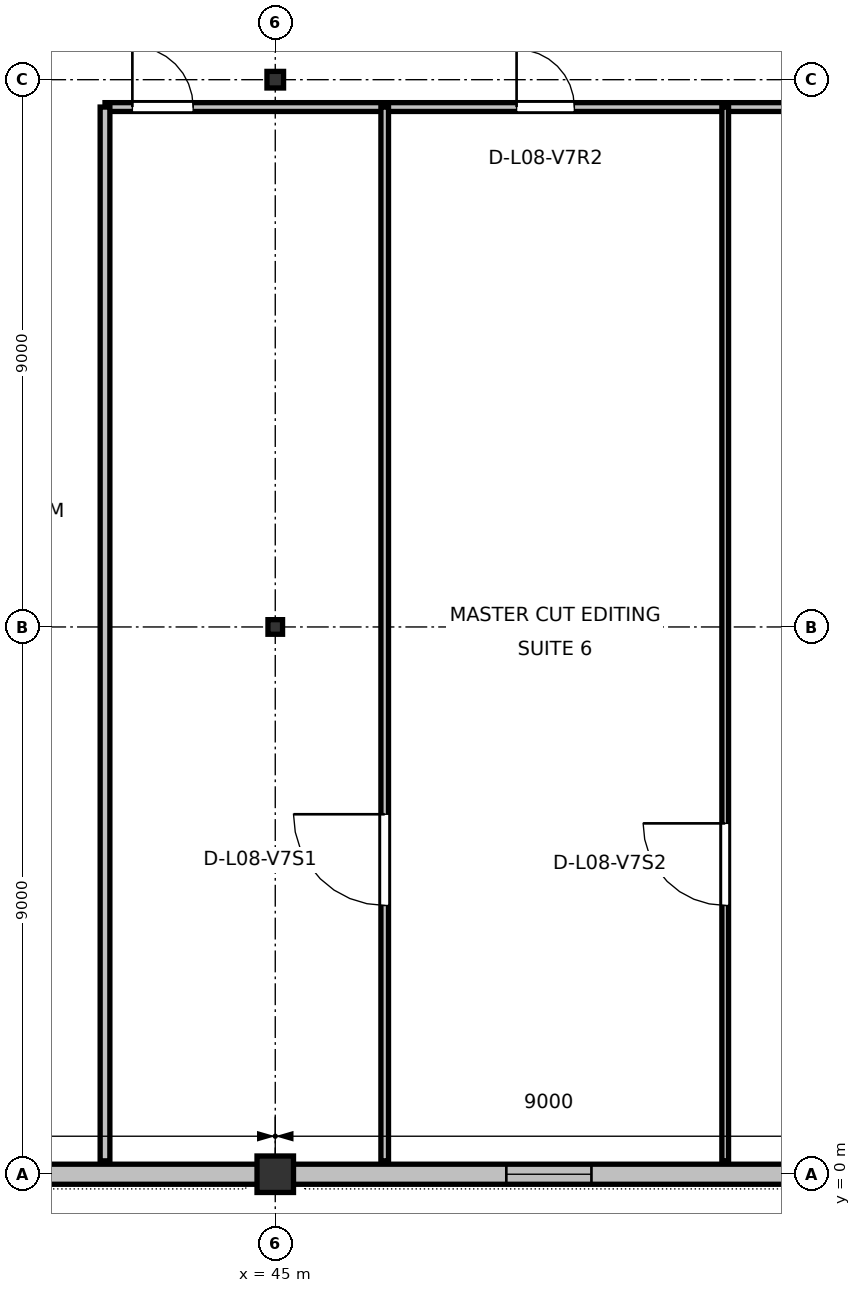
"""IFC4 building model, lengths in metres.
Left out: names, types, materials, properties, quantities, classifications, styles, units other than length and angle.
Written with IfcOpenShell. Run it as: python <this file> out.ifc"""

import sys

from ifc_helpers import new_model, si_unit, direction, frame, frame_2d, origin, origin_2d, place, context, subcontext, project, spatial, rectangle, hollow_circle, i_section, extrude, element, fill, save


model = new_model("IFC4")
c1 = context("Model", 3, precision=1e-05, world=origin(), true_north=direction((0.0, 1.0)))
c2 = subcontext(c1, "Body", "Model", "MODEL_VIEW")
j1 = project(units=[si_unit("LENGTHUNIT", "METRE"), si_unit("PLANEANGLEUNIT", "RADIAN")], contexts=[c1])
p1 = place(None, origin())
s1 = spatial("IfcSite", under=j1, at=p1, CompositionType="ELEMENT")
p2 = place(p1, origin())
s2 = spatial("IfcBuilding", under=s1, at=p2, CompositionType="ELEMENT")
p3 = place(p2, frame((0.0, 0.0, 36.0)))
s3 = spatial("IfcBuildingStorey", under=s2, at=p3, CompositionType="ELEMENT", Elevation=36.0)
p4 = place(p3, frame((45.0, 0.0, 0.0), z_axis=(0.0, 0.0, 1.0), x_axis=(1.0, 0.0, 0.0)))
e1 = element("IfcColumn", 1, at=p4, inside=s3, PredefinedType="COLUMN", context=c2, shape_type="SweptSolid", body=[
    extrude(rectangle(XDim=0.6, YDim=0.6, at=origin_2d()), origin(), (0.0, 0.0, 1.0), 4.2),
])
p5 = place(p3, frame((45.0, 9.0, 0.0), z_axis=(0.0, 0.0, 1.0), x_axis=(1.0, 0.0, 0.0)))
e2 = element("IfcColumn", 2, at=p5, inside=s3, PredefinedType="COLUMN", context=c2, shape_type="SweptSolid", body=[
    extrude(i_section(OverallWidth=0.24, OverallDepth=0.24, WebThickness=0.01, FlangeThickness=0.017, at=origin_2d()), origin(), (0.0, 0.0, 1.0), 4.2),
])
p6 = place(p3, frame((45.0, 18.0, 0.0), z_axis=(0.0, 0.0, 1.0), x_axis=(1.0, 0.0, 0.0)))
e3 = element("IfcColumn", 3, at=p6, inside=s3, PredefinedType="COLUMN", context=c2, shape_type="SweptSolid", body=[
    extrude(hollow_circle(Radius=0.136, WallThickness=0.012, at=origin_2d()), origin(), (0.0, 0.0, 1.0), 4.2),
])
p7 = place(p3, frame((36.285, 0.0, 0.0), z_axis=(0.0, 0.0, 1.0), x_axis=(1.0, 0.0, 0.0)))
e4 = element("IfcWall", 4, at=p7, inside=s3, PredefinedType="STANDARD", context=c2, shape_type="SweptSolid", body=[
    extrude(rectangle(XDim=8.43, YDim=0.33, at=frame_2d((4.215, 0.0))), origin(), (0.0, 0.0, 1.0), 3.755),
])
p8 = place(p7, frame((0.75, 0.0, 0.9)))
e5 = element("IfcOpeningElement", 5, at=p8, cuts=e4, PredefinedType="OPENING", context=c2, shape_type="SweptSolid", body=[
    extrude(rectangle(XDim=1.6, YDim=1.5, at=frame_2d((0.8, 0.75))), frame((0.0, 0.175, 0.0), z_axis=(0.0, -1.0, 0.0), x_axis=(1.0, 0.0, 0.0)), (0.0, 0.0, 1.0), 0.35),
])
p9 = place(p3, frame((45.285, 0.0, 0.0), z_axis=(0.0, 0.0, 1.0), x_axis=(1.0, 0.0, 0.0)))
e6 = element("IfcWall", 6, at=p9, inside=s3, PredefinedType="STANDARD", context=c2, shape_type="SweptSolid", body=[
    extrude(rectangle(XDim=8.43, YDim=0.33, at=frame_2d((4.215, 0.0))), origin(), (0.0, 0.0, 1.0), 3.755),
])
p10 = place(p9, frame((3.515, 0.0, 0.9)))
e7 = element("IfcOpeningElement", 7, at=p10, cuts=e6, PredefinedType="OPENING", context=c2, shape_type="SweptSolid", body=[
    extrude(rectangle(XDim=1.4, YDim=1.45, at=frame_2d((0.7, 0.725))), frame((0.0, 0.175, 0.0), z_axis=(0.0, -1.0, 0.0), x_axis=(1.0, 0.0, 0.0)), (0.0, 0.0, 1.0), 0.35),
])
p11 = place(p3, frame((42.2, 17.55, 0.0), z_axis=(0.0, 0.0, 1.0), x_axis=(1.0, 0.0, 0.0)))
e8 = element("IfcWall", 8, at=p11, inside=s3, PredefinedType="PARTITIONING", context=c2, shape_type="SweptSolid", body=[
    extrude(rectangle(XDim=23.6, YDim=0.145, at=frame_2d((11.8, 0.0))), origin(), (0.0, 0.0, 1.0), 3.96),
])
p12 = place(p11, frame((0.45, 0.0, 0.0)))
e9 = element("IfcOpeningElement", 9, at=p12, cuts=e8, PredefinedType="OPENING", context=c2, shape_type="SweptSolid", body=[
    extrude(rectangle(XDim=1.0, YDim=2.14, at=frame_2d((0.5, 1.07))), frame((0.0, 0.083, 0.0), z_axis=(0.0, -1.0, 0.0), x_axis=(1.0, 0.0, 0.0)), (0.0, 0.0, 1.0), 0.165),
])
p13 = place(p11, frame((6.769, 0.0, 0.0)))
e10 = element("IfcOpeningElement", 10, at=p13, cuts=e8, PredefinedType="OPENING", context=c2, shape_type="SweptSolid", body=[
    extrude(rectangle(XDim=0.95, YDim=2.12, at=frame_2d((0.475, 1.06))), frame((0.0, 0.083, 0.0), z_axis=(0.0, -1.0, 0.0), x_axis=(1.0, 0.0, 0.0)), (0.0, 0.0, 1.0), 0.165),
])
p14 = place(p11, frame((15.717, 0.0, 0.0)))
e11 = element("IfcOpeningElement", 11, at=p14, cuts=e8, PredefinedType="OPENING", context=c2, shape_type="SweptSolid", body=[
    extrude(rectangle(XDim=0.9, YDim=2.1, at=frame_2d((0.45, 1.05))), frame((0.0, 0.083, 0.0), z_axis=(0.0, -1.0, 0.0), x_axis=(1.0, 0.0, 0.0)), (0.0, 0.0, 1.0), 0.165),
])
p15 = place(p11, frame((21.95, 0.0, 0.0)))
e12 = element("IfcOpeningElement", 12, at=p15, cuts=e8, PredefinedType="OPENING", context=c2, shape_type="SweptSolid", body=[
    extrude(rectangle(XDim=1.2, YDim=2.18, at=frame_2d((0.6, 1.09))), frame((0.0, 0.083, 0.0), z_axis=(0.0, -1.0, 0.0), x_axis=(1.0, 0.0, 0.0)), (0.0, 0.0, 1.0), 0.165),
])
p16 = place(p3, frame((42.2, 0.22, 0.0), z_axis=(0.0, 0.0, 1.0), x_axis=(0.0, 1.0, 0.0)))
e13 = element("IfcWall", 13, at=p16, inside=s3, PredefinedType="PARTITIONING", context=c2, shape_type="SweptSolid", body=[
    extrude(rectangle(XDim=17.33, YDim=0.16, at=frame_2d((8.665, 0.0))), origin(), (0.0, 0.0, 1.0), 3.96),
])
p17 = place(p3, frame((46.8, 0.22, 0.0), z_axis=(0.0, 0.0, 1.0), x_axis=(0.0, 1.0, 0.0)))
e14 = element("IfcWall", 14, at=p17, inside=s3, PredefinedType="PARTITIONING", context=c2, shape_type="SweptSolid", body=[
    extrude(rectangle(XDim=17.33, YDim=0.125, at=frame_2d((8.665, 0.0))), origin(), (0.0, 0.0, 1.0), 3.96),
])
p18 = place(p17, frame((4.2, 0.0, 0.0)))
e15 = element("IfcOpeningElement", 15, at=p18, cuts=e14, PredefinedType="OPENING", context=c2, shape_type="SweptSolid", body=[
    extrude(rectangle(XDim=1.5, YDim=2.2, at=frame_2d((0.75, 1.1))), frame((0.0, 0.073, 0.0), z_axis=(0.0, -1.0, 0.0), x_axis=(1.0, 0.0, 0.0)), (0.0, 0.0, 1.0), 0.145),
])
p19 = place(p3, frame((52.4, 0.22, 0.0), z_axis=(0.0, 0.0, 1.0), x_axis=(0.0, 1.0, 0.0)))
e16 = element("IfcWall", 16, at=p19, inside=s3, PredefinedType="PARTITIONING", context=c2, shape_type="SweptSolid", body=[
    extrude(rectangle(XDim=17.33, YDim=0.11, at=frame_2d((8.665, 0.0))), origin(), (0.0, 0.0, 1.0), 3.96),
])
p20 = place(p19, frame((4.2, 0.0, 0.0)))
e17 = element("IfcOpeningElement", 17, at=p20, cuts=e16, PredefinedType="OPENING", context=c2, shape_type="SweptSolid", body=[
    extrude(rectangle(XDim=1.35, YDim=2.18, at=frame_2d((0.675, 1.09))), frame((0.0, 0.065, 0.0), z_axis=(0.0, -1.0, 0.0), x_axis=(1.0, 0.0, 0.0)), (0.0, 0.0, 1.0), 0.13),
])
p21 = place(p10, origin())
e18 = element("IfcWindow", 18, at=p21, inside=s3, PartitioningType="SINGLE_PANEL", PredefinedType="WINDOW", context=c2, shape_type="SweptSolid", body=[
    extrude(rectangle(XDim=1.4, YDim=1.45, at=frame_2d((0.7, 0.725))), frame((0.0, 0.03, 0.0), z_axis=(0.0, -1.0, 0.0), x_axis=(1.0, 0.0, 0.0)), (0.0, 0.0, 1.0), 0.06),
])
fill(e7, e18)
p22 = place(p12, origin())
e19 = element("IfcDoor", 19, at=p22, inside=s3, OperationType="SINGLE_SWING_LEFT", PredefinedType="DOOR", context=c2, shape_type="SweptSolid", body=[
    extrude(rectangle(XDim=1.0, YDim=2.14, at=frame_2d((0.5, 1.07))), frame((0.0, 0.025, 0.0), z_axis=(0.0, -1.0, 0.0), x_axis=(1.0, 0.0, 0.0)), (0.0, 0.0, 1.0), 0.05),
])
fill(e9, e19)
p23 = place(p18, origin())
e20 = element("IfcDoor", 20, at=p23, inside=s3, OperationType="SINGLE_SWING_RIGHT", PredefinedType="DOOR", context=c2, shape_type="SweptSolid", body=[
    extrude(rectangle(XDim=1.5, YDim=2.2, at=frame_2d((0.75, 1.1))), frame((0.0, 0.025, 0.0), z_axis=(0.0, -1.0, 0.0), x_axis=(1.0, 0.0, 0.0)), (0.0, 0.0, 1.0), 0.05),
])
fill(e15, e20)
p24 = place(p13, origin())
e21 = element("IfcDoor", 21, at=p24, inside=s3, OperationType="SINGLE_SWING_LEFT", PredefinedType="DOOR", context=c2, shape_type="SweptSolid", body=[
    extrude(rectangle(XDim=0.95, YDim=2.12, at=frame_2d((0.475, 1.06))), frame((0.0, 0.025, 0.0), z_axis=(0.0, -1.0, 0.0), x_axis=(1.0, 0.0, 0.0)), (0.0, 0.0, 1.0), 0.05),
])
fill(e10, e21)
p25 = place(p20, origin())
e22 = element("IfcDoor", 22, at=p25, inside=s3, OperationType="SINGLE_SWING_RIGHT", PredefinedType="DOOR", context=c2, shape_type="SweptSolid", body=[
    extrude(rectangle(XDim=1.35, YDim=2.18, at=frame_2d((0.675, 1.09))), frame((0.0, 0.025, 0.0), z_axis=(0.0, -1.0, 0.0), x_axis=(1.0, 0.0, 0.0)), (0.0, 0.0, 1.0), 0.05),
])
fill(e17, e22)
save(model, sys.argv[1])
